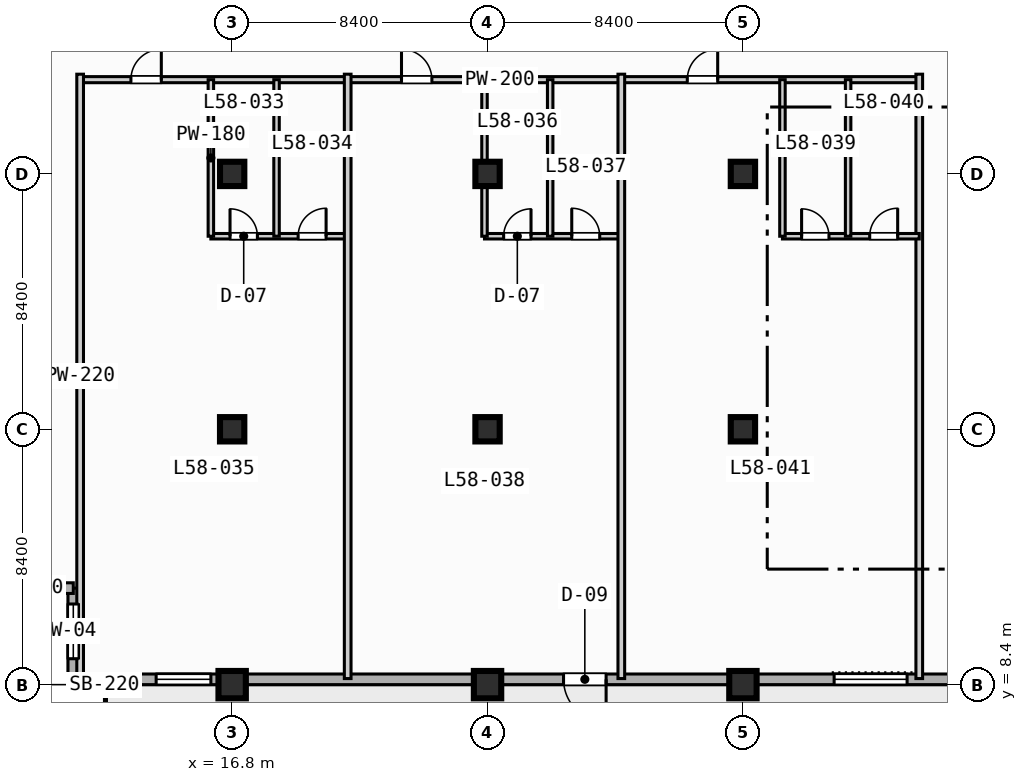
"""IFC4 building model, lengths in metres.
Left out: names, types, materials, properties, quantities, classifications, styles, units other than length and angle.
Written with IfcOpenShell. Run it as: python <this file> out.ifc"""

import sys

from ifc_helpers import new_model, si_unit, direction, frame, frame_2d, origin, origin_2d, place, context, subcontext, project, spatial, rectangle, extrude, element, fill, save


model = new_model("IFC4")
c1 = context("Model", 3, precision=1e-05, world=origin(), true_north=direction((0.0, 1.0)))
c2 = subcontext(c1, "Body", "Model", "MODEL_VIEW")
j1 = project(units=[si_unit("LENGTHUNIT", "METRE"), si_unit("PLANEANGLEUNIT", "RADIAN")], contexts=[c1])
p1 = place(None, origin())
s1 = spatial("IfcSite", under=j1, at=p1, CompositionType="ELEMENT")
p2 = place(p1, origin())
s2 = spatial("IfcBuilding", under=s1, at=p2, CompositionType="ELEMENT")
p3 = place(p2, frame((0.0, 0.0, 237.9)))
s3 = spatial("IfcBuildingStorey", under=s2, at=p3, CompositionType="ELEMENT", Elevation=237.9)
p4 = place(p3, frame((16.8, 8.4, 0.0), z_axis=(0.0, 0.0, 1.0), x_axis=(1.0, 0.0, 0.0)))
e1 = element("IfcColumn", 1, at=p4, inside=s3, PredefinedType="COLUMN", context=c2, shape_type="SweptSolid", body=[
    extrude(rectangle(XDim=0.9, YDim=0.9, at=origin_2d()), origin(), (0.0, 0.0, 1.0), 3.7),
])
for number, where, z_axis, x_axis in (
    (2, (16.8, 16.8, 0.0), (0.0, 0.0, 1.0), (1.0, 0.0, 0.0)),
    (3, (16.8, 25.2, 0.0), (0.0, 0.0, 1.0), (1.0, 0.0, 0.0)),
):
    element("IfcColumn", number, at=place(p3, frame(where, z_axis=z_axis, x_axis=x_axis)), inside=s3, PredefinedType="COLUMN", context=c2, shape_type="SweptSolid", body=[
        extrude(rectangle(XDim=0.8, YDim=0.8, at=origin_2d()), origin(), (0.0, 0.0, 1.0), 3.7),
    ])
p5 = place(p3, frame((25.2, 8.4, 0.0), z_axis=(0.0, 0.0, 1.0), x_axis=(1.0, 0.0, 0.0)))
e4 = element("IfcColumn", 4, at=p5, inside=s3, PredefinedType="COLUMN", context=c2, shape_type="SweptSolid", body=[
    extrude(rectangle(XDim=0.9, YDim=0.9, at=origin_2d()), origin(), (0.0, 0.0, 1.0), 3.7),
])
for number, where, z_axis, x_axis in (
    (5, (25.2, 16.8, 0.0), (0.0, 0.0, 1.0), (1.0, 0.0, 0.0)),
    (6, (25.2, 25.2, 0.0), (0.0, 0.0, 1.0), (1.0, 0.0, 0.0)),
):
    element("IfcColumn", number, at=place(p3, frame(where, z_axis=z_axis, x_axis=x_axis)), inside=s3, PredefinedType="COLUMN", context=c2, shape_type="SweptSolid", body=[
        extrude(rectangle(XDim=0.8, YDim=0.8, at=origin_2d()), origin(), (0.0, 0.0, 1.0), 3.7),
    ])
p6 = place(p3, frame((33.6, 8.4, 0.0), z_axis=(0.0, 0.0, 1.0), x_axis=(1.0, 0.0, 0.0)))
e7 = element("IfcColumn", 7, at=p6, inside=s3, PredefinedType="COLUMN", context=c2, shape_type="SweptSolid", body=[
    extrude(rectangle(XDim=0.9, YDim=0.9, at=origin_2d()), origin(), (0.0, 0.0, 1.0), 3.7),
])
for number, where, z_axis, x_axis in (
    (8, (33.6, 16.8, 0.0), (0.0, 0.0, 1.0), (1.0, 0.0, 0.0)),
    (9, (33.6, 25.2, 0.0), (0.0, 0.0, 1.0), (1.0, 0.0, 0.0)),
):
    element("IfcColumn", number, at=place(p3, frame(where, z_axis=z_axis, x_axis=x_axis)), inside=s3, PredefinedType="COLUMN", context=c2, shape_type="SweptSolid", body=[
        extrude(rectangle(XDim=0.8, YDim=0.8, at=origin_2d()), origin(), (0.0, 0.0, 1.0), 3.7),
    ])
p7 = place(p3, frame((11.575, 8.575, 0.0), z_axis=(0.0, 0.0, 1.0), x_axis=(0.0, 1.0, 0.0)))
e10 = element("IfcWall", 10, at=p7, inside=s3, PredefinedType="STANDARD", context=c2, shape_type="SweptSolid", body=[
    extrude(rectangle(XDim=3.0, YDim=0.35, at=frame_2d((1.5, 0.0))), origin(), (0.0, 0.0, 1.0), 3.47),
])
p8 = place(p7, frame((0.677, 0.0, 0.85)))
e11 = element("IfcOpeningElement", 11, at=p8, cuts=e10, PredefinedType="OPENING", context=c2, shape_type="SweptSolid", body=[
    extrude(rectangle(XDim=1.8, YDim=1.8, at=frame_2d((0.9, 0.9))), frame((0.0, 0.185, 0.0), z_axis=(0.0, -1.0, 0.0), x_axis=(1.0, 0.0, 0.0)), (0.0, 0.0, 1.0), 0.37),
])
p9 = place(p3, frame((11.575, 11.575, 0.0), z_axis=(0.0, 0.0, 1.0), x_axis=(-1.0, 0.0, 0.0)))
e12 = element("IfcWall", 12, at=p9, inside=s3, PredefinedType="STANDARD", context=c2, shape_type="SweptSolid", body=[
    extrude(rectangle(XDim=3.0, YDim=0.35, at=frame_2d((1.5, 0.0))), origin(), (0.0, 0.0, 1.0), 3.47),
])
p10 = place(p3, frame((72.425, 8.575, 0.0), z_axis=(0.0, 0.0, 1.0), x_axis=(-1.0, 0.0, 0.0)))
e13 = element("IfcWall", 13, at=p10, inside=s3, PredefinedType="STANDARD", context=c2, shape_type="SweptSolid", body=[
    extrude(rectangle(XDim=60.85, YDim=0.35, at=frame_2d((30.425, 0.0))), origin(), (0.0, 0.0, 1.0), 3.47),
])
p11 = place(p10, frame((43.325, 0.0, 0.0)))
e14 = element("IfcOpeningElement", 14, at=p11, cuts=e13, PredefinedType="OPENING", context=c2, shape_type="SweptSolid", body=[
    extrude(rectangle(XDim=1.4, YDim=2.2, at=frame_2d((0.7, 1.1))), frame((0.0, 0.185, 0.0), z_axis=(0.0, -1.0, 0.0), x_axis=(1.0, 0.0, 0.0)), (0.0, 0.0, 1.0), 0.37),
])
p12 = place(p10, frame((33.425, 0.0, 0.85)))
e15 = element("IfcOpeningElement", 15, at=p12, cuts=e13, PredefinedType="OPENING", context=c2, shape_type="SweptSolid", body=[
    extrude(rectangle(XDim=2.4, YDim=1.95, at=frame_2d((1.2, 0.975))), frame((0.0, 0.185, 0.0), z_axis=(0.0, -1.0, 0.0), x_axis=(1.0, 0.0, 0.0)), (0.0, 0.0, 1.0), 0.37),
])
p13 = place(p10, frame((25.325, 0.0, 0.85)))
e16 = element("IfcOpeningElement", 16, at=p13, cuts=e13, PredefinedType="OPENING", context=c2, shape_type="SweptSolid", body=[
    extrude(rectangle(XDim=1.8, YDim=1.8, at=frame_2d((0.9, 0.9))), frame((0.0, 0.185, 0.0), z_axis=(0.0, -1.0, 0.0), x_axis=(1.0, 0.0, 0.0)), (0.0, 0.0, 1.0), 0.37),
])
p14 = place(p10, frame((56.325, 0.0, 0.85)))
e17 = element("IfcOpeningElement", 17, at=p14, cuts=e13, PredefinedType="OPENING", context=c2, shape_type="SweptSolid", body=[
    extrude(rectangle(XDim=1.8, YDim=1.8, at=frame_2d((0.9, 0.9))), frame((0.0, 0.185, 0.0), z_axis=(0.0, -1.0, 0.0), x_axis=(1.0, 0.0, 0.0)), (0.0, 0.0, 1.0), 0.37),
])
p15 = place(p3, frame((11.8, 28.3, 0.0), z_axis=(0.0, 0.0, 1.0), x_axis=(1.0, 0.0, 0.0)))
e18 = element("IfcWall", 18, at=p15, inside=s3, PredefinedType="PARTITIONING", context=c2, shape_type="SweptSolid", body=[
    extrude(rectangle(XDim=27.6, YDim=0.2, at=frame_2d((13.8, 0.0))), origin(), (0.0, 0.0, 1.0), 3.47),
])
p16 = place(p15, frame((1.67, 0.0, 0.0)))
e19 = element("IfcOpeningElement", 19, at=p16, cuts=e18, PredefinedType="OPENING", context=c2, shape_type="SweptSolid", body=[
    extrude(rectangle(XDim=1.0, YDim=2.15, at=frame_2d((0.5, 1.075))), frame((0.0, 0.11, 0.0), z_axis=(0.0, -1.0, 0.0), x_axis=(1.0, 0.0, 0.0)), (0.0, 0.0, 1.0), 0.22),
])
p17 = place(p15, frame((10.57, 0.0, 0.0)))
e20 = element("IfcOpeningElement", 20, at=p17, cuts=e18, PredefinedType="OPENING", context=c2, shape_type="SweptSolid", body=[
    extrude(rectangle(XDim=1.0, YDim=2.15, at=frame_2d((0.5, 1.075))), frame((0.0, 0.11, 0.0), z_axis=(0.0, -1.0, 0.0), x_axis=(1.0, 0.0, 0.0)), (0.0, 0.0, 1.0), 0.22),
])
p18 = place(p15, frame((19.97, 0.0, 0.0)))
e21 = element("IfcOpeningElement", 21, at=p18, cuts=e18, PredefinedType="OPENING", context=c2, shape_type="SweptSolid", body=[
    extrude(rectangle(XDim=1.0, YDim=2.15, at=frame_2d((0.5, 1.075))), frame((0.0, 0.11, 0.0), z_axis=(0.0, -1.0, 0.0), x_axis=(1.0, 0.0, 0.0)), (0.0, 0.0, 1.0), 0.22),
])
p19 = place(p3, frame((11.8, 8.6, 0.0), z_axis=(0.0, 0.0, 1.0), x_axis=(0.0, 1.0, 0.0)))
e22 = element("IfcWall", 22, at=p19, inside=s3, PredefinedType="PARTITIONING", context=c2, shape_type="SweptSolid", body=[
    extrude(rectangle(XDim=19.88, YDim=0.22, at=frame_2d((9.94, 0.0))), origin(), (0.0, 0.0, 1.0), 3.47),
])
p20 = place(p3, frame((16.1, 23.15, 0.0), z_axis=(0.0, 0.0, 1.0), x_axis=(1.0, 0.0, 0.0)))
e23 = element("IfcWall", 23, at=p20, inside=s3, PredefinedType="PLUMBINGWALL", context=c2, shape_type="SweptSolid", body=[
    extrude(rectangle(XDim=4.5, YDim=0.18, at=frame_2d((2.25, 0.0))), origin(), (0.0, 0.0, 1.0), 3.47),
])
p21 = place(p20, frame((0.63, 0.0, 0.0)))
e24 = element("IfcOpeningElement", 24, at=p21, cuts=e23, PredefinedType="OPENING", context=c2, shape_type="SweptSolid", body=[
    extrude(rectangle(XDim=0.9, YDim=2.1, at=frame_2d((0.45, 1.05))), frame((0.0, 0.1, 0.0), z_axis=(0.0, -1.0, 0.0), x_axis=(1.0, 0.0, 0.0)), (0.0, 0.0, 1.0), 0.2),
])
p22 = place(p20, frame((2.87, 0.0, 0.0)))
e25 = element("IfcOpeningElement", 25, at=p22, cuts=e23, PredefinedType="OPENING", context=c2, shape_type="SweptSolid", body=[
    extrude(rectangle(XDim=0.92, YDim=2.1, at=frame_2d((0.46, 1.05))), frame((0.0, 0.1, 0.0), z_axis=(0.0, -1.0, 0.0), x_axis=(1.0, 0.0, 0.0)), (0.0, 0.0, 1.0), 0.2),
])
for number, where, z_axis, x_axis in (
    (26, (16.1, 23.15, 0.0), (0.0, 0.0, 1.0), (0.0, 1.0, 0.0)),
    (27, (18.26, 23.15, 0.0), (0.0, 0.0, 1.0), (0.0, 1.0, 0.0)),
):
    element("IfcWall", number, at=place(p3, frame(where, z_axis=z_axis, x_axis=x_axis)), inside=s3, PredefinedType="PLUMBINGWALL", context=c2, shape_type="SweptSolid", body=[
        extrude(rectangle(XDim=5.15, YDim=0.18, at=frame_2d((2.575, 0.0))), origin(), (0.0, 0.0, 1.0), 3.47),
    ])
p23 = place(p3, frame((20.6, 8.6, 0.0), z_axis=(0.0, 0.0, 1.0), x_axis=(0.0, 1.0, 0.0)))
e28 = element("IfcWall", 28, at=p23, inside=s3, PredefinedType="PARTITIONING", context=c2, shape_type="SweptSolid", body=[
    extrude(rectangle(XDim=19.88, YDim=0.22, at=frame_2d((9.94, 0.0))), origin(), (0.0, 0.0, 1.0), 3.47),
])
p24 = place(p3, frame((25.1, 23.15, 0.0), z_axis=(0.0, 0.0, 1.0), x_axis=(1.0, 0.0, 0.0)))
e29 = element("IfcWall", 29, at=p24, inside=s3, PredefinedType="PLUMBINGWALL", context=c2, shape_type="SweptSolid", body=[
    extrude(rectangle(XDim=4.5, YDim=0.18, at=frame_2d((2.25, 0.0))), origin(), (0.0, 0.0, 1.0), 3.47),
])
p25 = place(p24, frame((0.63, 0.0, 0.0)))
e30 = element("IfcOpeningElement", 30, at=p25, cuts=e29, PredefinedType="OPENING", context=c2, shape_type="SweptSolid", body=[
    extrude(rectangle(XDim=0.9, YDim=2.1, at=frame_2d((0.45, 1.05))), frame((0.0, 0.1, 0.0), z_axis=(0.0, -1.0, 0.0), x_axis=(1.0, 0.0, 0.0)), (0.0, 0.0, 1.0), 0.2),
])
p26 = place(p24, frame((2.87, 0.0, 0.0)))
e31 = element("IfcOpeningElement", 31, at=p26, cuts=e29, PredefinedType="OPENING", context=c2, shape_type="SweptSolid", body=[
    extrude(rectangle(XDim=0.92, YDim=2.1, at=frame_2d((0.46, 1.05))), frame((0.0, 0.1, 0.0), z_axis=(0.0, -1.0, 0.0), x_axis=(1.0, 0.0, 0.0)), (0.0, 0.0, 1.0), 0.2),
])
p27 = place(p3, frame((25.1, 23.15, 0.0), z_axis=(0.0, 0.0, 1.0), x_axis=(0.0, 1.0, 0.0)))
e32 = element("IfcWall", 32, at=p27, inside=s3, PredefinedType="PLUMBINGWALL", context=c2, shape_type="SweptSolid", body=[
    extrude(rectangle(XDim=5.15, YDim=0.18, at=frame_2d((2.575, 0.0))), origin(), (0.0, 0.0, 1.0), 2.82),
])
p28 = place(p3, frame((27.26, 23.15, 0.0), z_axis=(0.0, 0.0, 1.0), x_axis=(0.0, 1.0, 0.0)))
e33 = element("IfcWall", 33, at=p28, inside=s3, PredefinedType="PLUMBINGWALL", context=c2, shape_type="SweptSolid", body=[
    extrude(rectangle(XDim=5.15, YDim=0.18, at=frame_2d((2.575, 0.0))), origin(), (0.0, 0.0, 1.0), 3.47),
])
for number, where, z_axis, x_axis in (
    (34, (29.6, 8.6, 0.0), (0.0, 0.0, 1.0), (0.0, 1.0, 0.0)),
    (35, (39.4, 8.6, 0.0), (0.0, 0.0, 1.0), (0.0, 1.0, 0.0)),
):
    element("IfcWall", number, at=place(p3, frame(where, z_axis=z_axis, x_axis=x_axis)), inside=s3, PredefinedType="PARTITIONING", context=c2, shape_type="SweptSolid", body=[
        extrude(rectangle(XDim=19.88, YDim=0.22, at=frame_2d((9.94, 0.0))), origin(), (0.0, 0.0, 1.0), 3.47),
    ])
p29 = place(p3, frame((34.9, 23.15, 0.0), z_axis=(0.0, 0.0, 1.0), x_axis=(1.0, 0.0, 0.0)))
e36 = element("IfcWall", 36, at=p29, inside=s3, PredefinedType="PLUMBINGWALL", context=c2, shape_type="SweptSolid", body=[
    extrude(rectangle(XDim=4.5, YDim=0.18, at=frame_2d((2.25, 0.0))), origin(), (0.0, 0.0, 1.0), 3.47),
])
p30 = place(p29, frame((0.63, 0.0, 0.0)))
e37 = element("IfcOpeningElement", 37, at=p30, cuts=e36, PredefinedType="OPENING", context=c2, shape_type="SweptSolid", body=[
    extrude(rectangle(XDim=0.9, YDim=2.1, at=frame_2d((0.45, 1.05))), frame((0.0, 0.1, 0.0), z_axis=(0.0, -1.0, 0.0), x_axis=(1.0, 0.0, 0.0)), (0.0, 0.0, 1.0), 0.2),
])
p31 = place(p29, frame((2.87, 0.0, 0.0)))
e38 = element("IfcOpeningElement", 38, at=p31, cuts=e36, PredefinedType="OPENING", context=c2, shape_type="SweptSolid", body=[
    extrude(rectangle(XDim=0.92, YDim=2.1, at=frame_2d((0.46, 1.05))), frame((0.0, 0.1, 0.0), z_axis=(0.0, -1.0, 0.0), x_axis=(1.0, 0.0, 0.0)), (0.0, 0.0, 1.0), 0.2),
])
for number, where, z_axis, x_axis in (
    (39, (34.9, 23.15, 0.0), (0.0, 0.0, 1.0), (0.0, 1.0, 0.0)),
    (40, (37.06, 23.15, 0.0), (0.0, 0.0, 1.0), (0.0, 1.0, 0.0)),
):
    element("IfcWall", number, at=place(p3, frame(where, z_axis=z_axis, x_axis=x_axis)), inside=s3, PredefinedType="PLUMBINGWALL", context=c2, shape_type="SweptSolid", body=[
        extrude(rectangle(XDim=5.15, YDim=0.18, at=frame_2d((2.575, 0.0))), origin(), (0.0, 0.0, 1.0), 3.47),
    ])
p32 = place(p8, origin())
e41 = element("IfcWindow", 41, at=p32, inside=s3, PartitioningType="SINGLE_PANEL", PredefinedType="WINDOW", context=c2, shape_type="SweptSolid", body=[
    extrude(rectangle(XDim=1.8, YDim=1.8, at=frame_2d((0.9, 0.9))), frame((0.0, 0.03, 0.0), z_axis=(0.0, -1.0, 0.0), x_axis=(1.0, 0.0, 0.0)), (0.0, 0.0, 1.0), 0.06),
])
fill(e11, e41)
p33 = place(p11, origin())
e42 = element("IfcDoor", 42, at=p33, inside=s3, OperationType="SINGLE_SWING_LEFT", PredefinedType="DOOR", context=c2, shape_type="SweptSolid", body=[
    extrude(rectangle(XDim=1.4, YDim=2.2, at=frame_2d((0.7, 1.1))), frame((0.0, 0.025, 0.0), z_axis=(0.0, -1.0, 0.0), x_axis=(1.0, 0.0, 0.0)), (0.0, 0.0, 1.0), 0.05),
])
fill(e14, e42)
p34 = place(p12, origin())
e43 = element("IfcWindow", 43, at=p34, inside=s3, PartitioningType="SINGLE_PANEL", PredefinedType="WINDOW", context=c2, shape_type="SweptSolid", body=[
    extrude(rectangle(XDim=2.4, YDim=1.95, at=frame_2d((1.2, 0.975))), frame((0.0, 0.03, 0.0), z_axis=(0.0, -1.0, 0.0), x_axis=(1.0, 0.0, 0.0)), (0.0, 0.0, 1.0), 0.06),
])
fill(e15, e43)
p35 = place(p14, origin())
e44 = element("IfcWindow", 44, at=p35, inside=s3, PartitioningType="SINGLE_PANEL", PredefinedType="WINDOW", context=c2, shape_type="SweptSolid", body=[
    extrude(rectangle(XDim=1.8, YDim=1.8, at=frame_2d((0.9, 0.9))), frame((0.0, 0.03, 0.0), z_axis=(0.0, -1.0, 0.0), x_axis=(1.0, 0.0, 0.0)), (0.0, 0.0, 1.0), 0.06),
])
fill(e17, e44)
p36 = place(p16, origin())
e45 = element("IfcDoor", 45, at=p36, inside=s3, OperationType="SINGLE_SWING_RIGHT", PredefinedType="DOOR", context=c2, shape_type="SweptSolid", body=[
    extrude(rectangle(XDim=1.0, YDim=2.15, at=frame_2d((0.5, 1.075))), frame((0.0, 0.025, 0.0), z_axis=(0.0, -1.0, 0.0), x_axis=(1.0, 0.0, 0.0)), (0.0, 0.0, 1.0), 0.05),
])
fill(e19, e45)
p37 = place(p17, origin())
e46 = element("IfcDoor", 46, at=p37, inside=s3, OperationType="SINGLE_SWING_LEFT", PredefinedType="DOOR", context=c2, shape_type="SweptSolid", body=[
    extrude(rectangle(XDim=1.0, YDim=2.15, at=frame_2d((0.5, 1.075))), frame((0.0, 0.025, 0.0), z_axis=(0.0, -1.0, 0.0), x_axis=(1.0, 0.0, 0.0)), (0.0, 0.0, 1.0), 0.05),
])
fill(e20, e46)
p38 = place(p18, origin())
e47 = element("IfcDoor", 47, at=p38, inside=s3, OperationType="SINGLE_SWING_RIGHT", PredefinedType="DOOR", context=c2, shape_type="SweptSolid", body=[
    extrude(rectangle(XDim=1.0, YDim=2.15, at=frame_2d((0.5, 1.075))), frame((0.0, 0.025, 0.0), z_axis=(0.0, -1.0, 0.0), x_axis=(1.0, 0.0, 0.0)), (0.0, 0.0, 1.0), 0.05),
])
fill(e21, e47)
p39 = place(p21, origin())
e48 = element("IfcDoor", 48, at=p39, inside=s3, OperationType="SINGLE_SWING_LEFT", PredefinedType="DOOR", context=c2, shape_type="SweptSolid", body=[
    extrude(rectangle(XDim=0.9, YDim=2.1, at=frame_2d((0.45, 1.05))), frame((0.0, 0.025, 0.0), z_axis=(0.0, -1.0, 0.0), x_axis=(1.0, 0.0, 0.0)), (0.0, 0.0, 1.0), 0.05),
])
fill(e24, e48)
p40 = place(p22, origin())
e49 = element("IfcDoor", 49, at=p40, inside=s3, OperationType="SINGLE_SWING_RIGHT", PredefinedType="DOOR", context=c2, shape_type="SweptSolid", body=[
    extrude(rectangle(XDim=0.92, YDim=2.1, at=frame_2d((0.46, 1.05))), frame((0.0, 0.025, 0.0), z_axis=(0.0, -1.0, 0.0), x_axis=(1.0, 0.0, 0.0)), (0.0, 0.0, 1.0), 0.05),
])
fill(e25, e49)
p41 = place(p25, origin())
e50 = element("IfcDoor", 50, at=p41, inside=s3, OperationType="SINGLE_SWING_RIGHT", PredefinedType="DOOR", context=c2, shape_type="SweptSolid", body=[
    extrude(rectangle(XDim=0.9, YDim=2.1, at=frame_2d((0.45, 1.05))), frame((0.0, 0.025, 0.0), z_axis=(0.0, -1.0, 0.0), x_axis=(1.0, 0.0, 0.0)), (0.0, 0.0, 1.0), 0.05),
])
fill(e30, e50)
p42 = place(p26, origin())
e51 = element("IfcDoor", 51, at=p42, inside=s3, OperationType="SINGLE_SWING_LEFT", PredefinedType="DOOR", context=c2, shape_type="SweptSolid", body=[
    extrude(rectangle(XDim=0.92, YDim=2.1, at=frame_2d((0.46, 1.05))), frame((0.0, 0.025, 0.0), z_axis=(0.0, -1.0, 0.0), x_axis=(1.0, 0.0, 0.0)), (0.0, 0.0, 1.0), 0.05),
])
fill(e31, e51)
p43 = place(p30, origin())
e52 = element("IfcDoor", 52, at=p43, inside=s3, OperationType="SINGLE_SWING_LEFT", PredefinedType="DOOR", context=c2, shape_type="SweptSolid", body=[
    extrude(rectangle(XDim=0.9, YDim=2.1, at=frame_2d((0.45, 1.05))), frame((0.0, 0.025, 0.0), z_axis=(0.0, -1.0, 0.0), x_axis=(1.0, 0.0, 0.0)), (0.0, 0.0, 1.0), 0.05),
])
fill(e37, e52)
p44 = place(p31, origin())
e53 = element("IfcDoor", 53, at=p44, inside=s3, OperationType="SINGLE_SWING_RIGHT", PredefinedType="DOOR", context=c2, shape_type="SweptSolid", body=[
    extrude(rectangle(XDim=0.92, YDim=2.1, at=frame_2d((0.46, 1.05))), frame((0.0, 0.025, 0.0), z_axis=(0.0, -1.0, 0.0), x_axis=(1.0, 0.0, 0.0)), (0.0, 0.0, 1.0), 0.05),
])
fill(e38, e53)
save(model, sys.argv[1])
